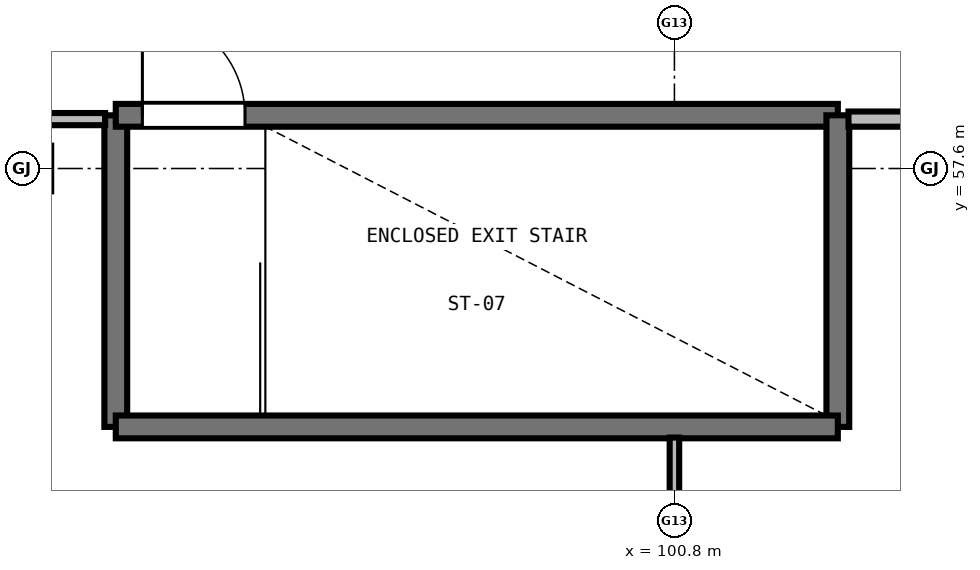
"""IFC4 building model, lengths in metres.
Left out: names, types, materials, properties, quantities, classifications, styles, units other than length and angle.
Written with IfcOpenShell. Run it as: python <this file> out.ifc"""

import sys

from ifc_helpers import new_model, si_unit, direction, frame, frame_2d, origin, place, context, subcontext, project, spatial, rectangle, extrude, element, fill, save


model = new_model("IFC4")
c1 = context("Model", 3, precision=1e-05, world=origin(), true_north=direction((0.0, 1.0)))
c2 = subcontext(c1, "Body", "Model", "MODEL_VIEW")
j1 = project(units=[si_unit("LENGTHUNIT", "METRE"), si_unit("PLANEANGLEUNIT", "RADIAN")], contexts=[c1])
p1 = place(None, origin())
s1 = spatial("IfcSite", under=j1, at=p1, CompositionType="ELEMENT")
p2 = place(p1, origin())
s2 = spatial("IfcBuilding", under=s1, at=p2, CompositionType="ELEMENT")
p3 = place(p2, frame((0.0, 0.0, 9.3)))
s3 = spatial("IfcBuildingStorey", under=s2, at=p3, CompositionType="ELEMENT", Elevation=9.3)
p4 = place(p3, frame((93.45, 54.2, 0.0), z_axis=(0.0, 0.0, 1.0), x_axis=(0.0, 1.0, 0.0)))
e1 = element("IfcWall", 1, at=p4, inside=s3, PredefinedType="SHEAR", context=c2, shape_type="SweptSolid", body=[
    extrude(rectangle(XDim=4.1, YDim=0.3, at=frame_2d((2.05, 0.0))), origin(), (0.0, 0.0, 1.0), 3.94),
])
p5 = place(p3, frame((93.45, 58.3, 0.0), z_axis=(0.0, 0.0, 1.0), x_axis=(1.0, 0.0, 0.0)))
e2 = element("IfcWall", 2, at=p5, inside=s3, PredefinedType="SHEAR", context=c2, shape_type="SweptSolid", body=[
    extrude(rectangle(XDim=9.5, YDim=0.3, at=frame_2d((4.75, 0.0))), origin(), (0.0, 0.0, 1.0), 3.94),
])
p6 = place(p5, frame((0.35, 0.0, 0.0)))
e3 = element("IfcOpeningElement", 3, at=p6, cuts=e2, PredefinedType="OPENING", context=c2, shape_type="SweptSolid", body=[
    extrude(rectangle(XDim=1.35, YDim=2.2, at=frame_2d((0.675, 1.1))), frame((0.0, 0.16, 0.0), z_axis=(0.0, -1.0, 0.0), x_axis=(1.0, 0.0, 0.0)), (0.0, 0.0, 1.0), 0.32),
])
p7 = place(p3, frame((102.95, 58.3, 0.0), z_axis=(0.0, 0.0, 1.0), x_axis=(0.0, -1.0, 0.0)))
e4 = element("IfcWall", 4, at=p7, inside=s3, PredefinedType="SHEAR", context=c2, shape_type="SweptSolid", body=[
    extrude(rectangle(XDim=4.1, YDim=0.3, at=frame_2d((2.05, 0.0))), origin(), (0.0, 0.0, 1.0), 3.94),
])
p8 = place(p3, frame((102.95, 54.2, 0.0), z_axis=(0.0, 0.0, 1.0), x_axis=(-1.0, 0.0, 0.0)))
e5 = element("IfcWall", 5, at=p8, inside=s3, PredefinedType="SHEAR", context=c2, shape_type="SweptSolid", body=[
    extrude(rectangle(XDim=9.5, YDim=0.3, at=frame_2d((4.75, 0.0))), origin(), (0.0, 0.0, 1.0), 3.94),
])
p9 = place(p3, frame((93.31, 58.25, 0.0), z_axis=(0.0, 0.0, 1.0), x_axis=(-1.0, 0.0, 0.0)))
e6 = element("IfcWall", 6, at=p9, inside=s3, PredefinedType="PARTITIONING", context=c2, shape_type="SweptSolid", body=[
    extrude(rectangle(XDim=45.74, YDim=0.16, at=frame_2d((22.87, 0.0))), origin(), (0.0, 0.0, 1.0), 3.325),
])
p10 = place(p9, frame((43.84, 0.0, 0.0)))
e7 = element("IfcOpeningElement", 7, at=p10, cuts=e6, PredefinedType="OPENING", context=c2, shape_type="SweptSolid", body=[
    extrude(rectangle(XDim=1.45, YDim=2.2, at=frame_2d((0.725, 1.1))), frame((0.0, 0.09, 0.0), z_axis=(0.0, -1.0, 0.0), x_axis=(1.0, 0.0, 0.0)), (0.0, 0.0, 1.0), 0.18),
])
p11 = place(p3, frame((100.8, 50.645, 0.0), z_axis=(0.0, 0.0, 1.0), x_axis=(0.0, 1.0, 0.0)))
e8 = element("IfcWall", 8, at=p11, inside=s3, PredefinedType="PARTITIONING", context=c2, shape_type="SweptSolid", body=[
    extrude(rectangle(XDim=3.415, YDim=0.125, at=frame_2d((1.708, 0.0))), origin(), (0.0, 0.0, 1.0), 3.175),
])
p12 = place(p3, frame((134.18, 58.25, 0.0), z_axis=(0.0, 0.0, 1.0), x_axis=(-1.0, 0.0, 0.0)))
e9 = element("IfcWall", 9, at=p12, inside=s3, PredefinedType="SOLIDWALL", context=c2, shape_type="SweptSolid", body=[
    extrude(rectangle(XDim=31.09, YDim=0.2, at=frame_2d((15.545, 0.0))), origin(), (0.0, 0.0, 1.0), 3.325),
])
p13 = place(p12, frame((28.405, 0.0, 0.0)))
e10 = element("IfcOpeningElement", 10, at=p13, cuts=e9, PredefinedType="OPENING", context=c2, shape_type="SweptSolid", body=[
    extrude(rectangle(XDim=1.55, YDim=2.2, at=frame_2d((0.775, 1.1))), frame((0.0, 0.11, 0.0), z_axis=(0.0, -1.0, 0.0), x_axis=(1.0, 0.0, 0.0)), (0.0, 0.0, 1.0), 0.22),
])
p14 = place(p6, origin())
e11 = element("IfcDoor", 11, at=p14, inside=s3, OperationType="SINGLE_SWING_LEFT", PredefinedType="DOOR", context=c2, shape_type="SweptSolid", body=[
    extrude(rectangle(XDim=1.35, YDim=2.2, at=frame_2d((0.675, 1.1))), frame((0.0, 0.025, 0.0), z_axis=(0.0, -1.0, 0.0), x_axis=(1.0, 0.0, 0.0)), (0.0, 0.0, 1.0), 0.05),
])
fill(e3, e11)
save(model, sys.argv[1])
